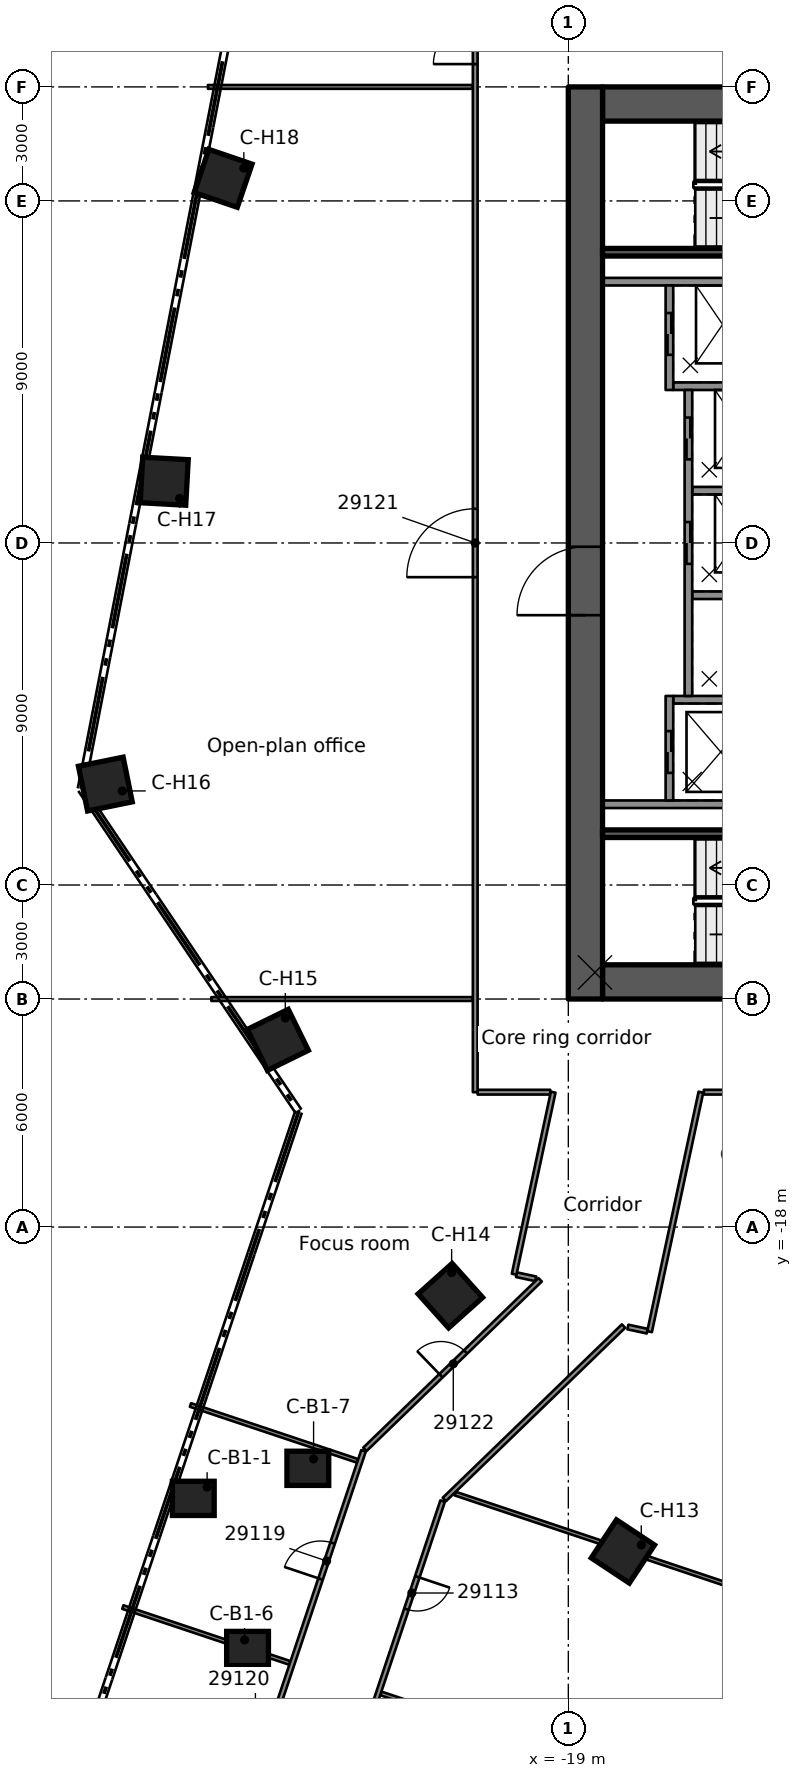
"""IFC4 building model, lengths in metres.
Left out: names, types, materials, properties, quantities, classifications, styles, units other than length and angle.
Written with IfcOpenShell. Run it as: python <this file> out.ifc"""

import sys

from ifc_helpers import new_model, si_unit, direction, frame, frame_2d, origin, origin_2d, place, context, subcontext, project, spatial, rectangle, extrude, element, fill, save


model = new_model("IFC4")
c1 = context("Model", 3, precision=1e-05, world=origin(), true_north=direction((0.0, 1.0)))
c2 = subcontext(c1, "Body", "Model", "MODEL_VIEW")
j1 = project(units=[si_unit("LENGTHUNIT", "METRE"), si_unit("PLANEANGLEUNIT", "RADIAN")], contexts=[c1])
p1 = place(None, origin())
s1 = spatial("IfcSite", under=j1, at=p1, CompositionType="ELEMENT")
p2 = place(p1, origin())
s2 = spatial("IfcBuilding", under=s1, at=p2, CompositionType="ELEMENT")
p3 = place(p2, frame((0.0, 0.0, 149.1)))
s3 = spatial("IfcBuildingStorey", under=s2, at=p3, CompositionType="ELEMENT", Elevation=149.1)
p4 = place(p3, frame((-18.1, 11.55, 0.0), z_axis=(0.0, 0.0, 1.0), x_axis=(1.0, 0.0, 0.0)))
e1 = element("IfcWall", 1, at=p4, inside=s3, PredefinedType="SHEAR", context=c2, shape_type="SweptSolid", body=[
    extrude(rectangle(XDim=9.2, YDim=0.9, at=frame_2d((4.6, 0.0))), origin(), (0.0, 0.0, 1.0), 3.5),
])
p5 = place(p4, frame((5.1, 0.0, 0.0)))
e2 = element("IfcOpeningElement", 2, at=p5, cuts=e1, PredefinedType="OPENING", context=c2, shape_type="SweptSolid", body=[
    extrude(rectangle(XDim=1.1, YDim=2.1, at=frame_2d((0.55, 1.05))), frame((0.0, 0.46, 0.0), z_axis=(0.0, -1.0, 0.0), x_axis=(1.0, 0.0, 0.0)), (0.0, 0.0, 1.0), 0.92),
])
p6 = place(p3, frame((-18.1, -11.55, 0.0), z_axis=(0.0, 0.0, 1.0), x_axis=(1.0, 0.0, 0.0)))
e3 = element("IfcWall", 3, at=p6, inside=s3, PredefinedType="SHEAR", context=c2, shape_type="SweptSolid", body=[
    extrude(rectangle(XDim=9.2, YDim=0.9, at=frame_2d((4.6, 0.0))), origin(), (0.0, 0.0, 1.0), 3.5),
])
p7 = place(p6, frame((5.1, 0.0, 0.0)))
e4 = element("IfcOpeningElement", 4, at=p7, cuts=e3, PredefinedType="OPENING", context=c2, shape_type="SweptSolid", body=[
    extrude(rectangle(XDim=1.1, YDim=2.1, at=frame_2d((0.55, 1.05))), frame((0.0, 0.46, 0.0), z_axis=(0.0, -1.0, 0.0), x_axis=(1.0, 0.0, 0.0)), (0.0, 0.0, 1.0), 0.92),
])
p8 = place(p6, frame((7.53, 0.0, 0.0)))
e5 = element("IfcOpeningElement", 5, at=p8, cuts=e3, PredefinedType="OPENING", context=c2, shape_type="SweptSolid", body=[
    extrude(rectangle(XDim=0.9, YDim=2.1, at=frame_2d((0.45, 1.05))), frame((0.0, 0.46, 0.0), z_axis=(0.0, -1.0, 0.0), x_axis=(1.0, 0.0, 0.0)), (0.0, 0.0, 1.0), 0.92),
])
p9 = place(p3, frame((-18.55, -12.0, 0.0), z_axis=(0.0, 0.0, 1.0), x_axis=(0.0, 1.0, 0.0)))
e6 = element("IfcWall", 6, at=p9, inside=s3, PredefinedType="SHEAR", context=c2, shape_type="SweptSolid", body=[
    extrude(rectangle(XDim=24.0, YDim=0.9, at=frame_2d((12.0, 0.0))), origin(), (0.0, 0.0, 1.0), 3.5),
])
p10 = place(p9, frame((10.1, 0.0, 0.0)))
e7 = element("IfcOpeningElement", 7, at=p10, cuts=e6, PredefinedType="OPENING", context=c2, shape_type="SweptSolid", body=[
    extrude(rectangle(XDim=1.8, YDim=2.1, at=frame_2d((0.9, 1.05))), frame((0.0, 0.46, 0.0), z_axis=(0.0, -1.0, 0.0), x_axis=(1.0, 0.0, 0.0)), (0.0, 0.0, 1.0), 0.92),
])
for number, where, z_axis, x_axis in (
    (8, (-28.869, -25.139, 0.0), (0.0, 0.0, 1.0), (1.0, 0.0, 0.0)),
    (9, (-27.441, -29.089, 0.0), (0.0, 0.0, 1.0), (1.0, 0.0, 0.0)),
    (10, (-25.855, -24.348, 0.0), (0.0, 0.0, 1.0), (1.0, 0.0, 0.0)),
):
    element("IfcColumn", number, at=place(p3, frame(where, z_axis=z_axis, x_axis=x_axis)), inside=s3, PredefinedType="COLUMN", context=c2, shape_type="SweptSolid", body=[
        extrude(rectangle(XDim=1.1, YDim=0.9, at=origin_2d()), origin(), (0.0, 0.0, 1.0), 3.5),
    ])
for number, where, z_axis, x_axis in (
    (11, (-17.564, -26.536, 0.0), (0.0, 0.0, 1.0), (-0.552, -0.834, 0.0)),
    (12, (-22.104, -19.806, 0.0), (0.0, 0.0, 1.0), (-0.745, -0.667, 0.0)),
    (13, (-26.644, -13.075, 0.0), (0.0, 0.0, 1.0), (-0.898, -0.441, 0.0)),
    (14, (-31.183, -6.344, 0.0), (0.0, 0.0, 1.0), (-0.98, -0.199, 0.0)),
    (15, (-29.634, 1.625, 0.0), (0.0, 0.0, 1.0), (-0.998, 0.055, 0.0)),
    (16, (-28.085, 9.594, 0.0), (0.0, 0.0, 1.0), (-0.946, 0.323, 0.0)),
):
    element("IfcColumn", number, at=place(p3, frame(where, z_axis=z_axis, x_axis=x_axis)), inside=s3, PredefinedType="COLUMN", context=c2, shape_type="SweptSolid", body=[
        extrude(rectangle(XDim=1.2, YDim=1.2, at=origin_2d()), origin(), (0.0, 0.0, 1.0), 3.5),
    ])
for number, where, z_axis, x_axis in (
    (17, (-11.54, 6.875, 0.0), (0.0, 0.0, 1.0), (-1.0, 0.0, 0.0)),
    (18, (-11.54, -6.875, 0.0), (0.0, 0.0, 1.0), (-1.0, 0.0, 0.0)),
):
    element("IfcWall", number, at=place(p3, frame(where, z_axis=z_axis, x_axis=x_axis)), inside=s3, PredefinedType="SOLIDWALL", context=c2, shape_type="SweptSolid", body=[
        extrude(rectangle(XDim=6.56, YDim=0.2, at=frame_2d((3.28, 0.0))), origin(), (0.0, 0.0, 1.0), 3.09),
    ])
p11 = place(p3, frame((-11.54, -4.125, 0.0), z_axis=(0.0, 0.0, 1.0), x_axis=(-1.0, 0.0, 0.0)))
e19 = element("IfcWall", 19, at=p11, inside=s3, PredefinedType="SOLIDWALL", context=c2, shape_type="SweptSolid", body=[
    extrude(rectangle(XDim=4.7, YDim=0.2, at=frame_2d((2.35, 0.0))), origin(), (0.0, 0.0, 1.0), 3.09),
])
p12 = place(p3, frame((-13.74, -1.375, 0.0), z_axis=(0.0, 0.0, 1.0), x_axis=(-1.0, 0.0, 0.0)))
e20 = element("IfcWall", 20, at=p12, inside=s3, PredefinedType="SOLIDWALL", context=c2, shape_type="SweptSolid", body=[
    extrude(rectangle(XDim=2.0, YDim=0.2, at=frame_2d((1.0, 0.0))), origin(), (0.0, 0.0, 1.0), 3.09),
])
p13 = place(p3, frame((-11.54, 1.375, 0.0), z_axis=(0.0, 0.0, 1.0), x_axis=(-1.0, 0.0, 0.0)))
e21 = element("IfcWall", 21, at=p13, inside=s3, PredefinedType="SOLIDWALL", context=c2, shape_type="SweptSolid", body=[
    extrude(rectangle(XDim=4.2, YDim=0.2, at=frame_2d((2.1, 0.0))), origin(), (0.0, 0.0, 1.0), 3.09),
])
p14 = place(p3, frame((-11.54, 4.125, 0.0), z_axis=(0.0, 0.0, 1.0), x_axis=(-1.0, 0.0, 0.0)))
e22 = element("IfcWall", 22, at=p14, inside=s3, PredefinedType="SOLIDWALL", context=c2, shape_type="SweptSolid", body=[
    extrude(rectangle(XDim=4.7, YDim=0.2, at=frame_2d((2.35, 0.0))), origin(), (0.0, 0.0, 1.0), 3.09),
])
p15 = place(p3, frame((-16.34, -6.775, 0.0), z_axis=(0.0, 0.0, 1.0), x_axis=(0.0, 1.0, 0.0)))
e23 = element("IfcWall", 23, at=p15, inside=s3, PredefinedType="SOLIDWALL", context=c2, shape_type="SweptSolid", body=[
    extrude(rectangle(XDim=2.75, YDim=0.2, at=frame_2d((1.375, 0.0))), origin(), (0.0, 0.0, 1.0), 3.09),
])
p16 = place(p15, frame((0.725, 0.0, 0.0)))
e24 = element("IfcOpeningElement", 24, at=p16, cuts=e23, PredefinedType="OPENING", context=c2, shape_type="SweptSolid", body=[
    extrude(rectangle(XDim=1.1, YDim=2.1, at=frame_2d((0.55, 1.05))), frame((0.0, 0.11, 0.0), z_axis=(0.0, -1.0, 0.0), x_axis=(1.0, 0.0, 0.0)), (0.0, 0.0, 1.0), 0.22),
])
p17 = place(p3, frame((-15.84, -4.025, 0.0), z_axis=(0.0, 0.0, 1.0), x_axis=(0.0, 1.0, 0.0)))
e25 = element("IfcWall", 25, at=p17, inside=s3, PredefinedType="SOLIDWALL", context=c2, shape_type="SweptSolid", body=[
    extrude(rectangle(XDim=8.05, YDim=0.2, at=frame_2d((4.025, 0.0))), origin(), (0.0, 0.0, 1.0), 3.09),
])
p18 = place(p17, frame((3.475, 0.0, 0.0)))
e26 = element("IfcOpeningElement", 26, at=p18, cuts=e25, PredefinedType="OPENING", context=c2, shape_type="SweptSolid", body=[
    extrude(rectangle(XDim=1.1, YDim=2.1, at=frame_2d((0.55, 1.05))), frame((0.0, 0.11, 0.0), z_axis=(0.0, -1.0, 0.0), x_axis=(1.0, 0.0, 0.0)), (0.0, 0.0, 1.0), 0.22),
])
p19 = place(p17, frame((6.225, 0.0, 0.0)))
e27 = element("IfcOpeningElement", 27, at=p19, cuts=e25, PredefinedType="OPENING", context=c2, shape_type="SweptSolid", body=[
    extrude(rectangle(XDim=1.1, YDim=2.1, at=frame_2d((0.55, 1.05))), frame((0.0, 0.11, 0.0), z_axis=(0.0, -1.0, 0.0), x_axis=(1.0, 0.0, 0.0)), (0.0, 0.0, 1.0), 0.22),
])
p20 = place(p3, frame((-16.34, 4.025, 0.0), z_axis=(0.0, 0.0, 1.0), x_axis=(0.0, 1.0, 0.0)))
e28 = element("IfcWall", 28, at=p20, inside=s3, PredefinedType="SOLIDWALL", context=c2, shape_type="SweptSolid", body=[
    extrude(rectangle(XDim=2.75, YDim=0.2, at=frame_2d((1.375, 0.0))), origin(), (0.0, 0.0, 1.0), 3.09),
])
p21 = place(p20, frame((0.925, 0.0, 0.0)))
e29 = element("IfcOpeningElement", 29, at=p21, cuts=e28, PredefinedType="OPENING", context=c2, shape_type="SweptSolid", body=[
    extrude(rectangle(XDim=1.1, YDim=2.1, at=frame_2d((0.55, 1.05))), frame((0.0, 0.11, 0.0), z_axis=(0.0, -1.0, 0.0), x_axis=(1.0, 0.0, 0.0)), (0.0, 0.0, 1.0), 0.22),
])
for number, where, z_axis, x_axis in (
    (30, (-11.54, 7.65, 0.0), (0.0, 0.0, 1.0), (-1.0, 0.0, 0.0)),
    (31, (-11.54, -7.65, 0.0), (0.0, 0.0, 1.0), (-1.0, 0.0, 0.0)),
):
    element("IfcWall", number, at=place(p3, frame(where, z_axis=z_axis, x_axis=x_axis)), inside=s3, PredefinedType="SOLIDWALL", context=c2, shape_type="SweptSolid", body=[
        extrude(rectangle(XDim=6.56, YDim=0.2, at=frame_2d((3.28, 0.0))), origin(), (0.0, 0.0, 1.0), 3.09),
    ])
p22 = place(p3, frame((-30.722, -27.999, 0.0), z_axis=(0.0, 0.0, 1.0), x_axis=(0.948355935611, -0.317208164132, 0.0)))
e32 = element("IfcWall", 32, at=p22, inside=s3, PredefinedType="PARTITIONING", context=c2, shape_type="SweptSolid", body=[
    extrude(rectangle(XDim=4.631, YDim=0.1, at=frame_2d((2.315, 0.0))), origin(), (0.0, 0.0, 1.0), 3.08),
])
p23 = place(p3, frame((-23.935, -30.27, 0.0), z_axis=(0.0, 0.0, 1.0), x_axis=(0.948326561211, -0.317295971139, 0.0)))
e33 = element("IfcWall", 33, at=p23, inside=s3, PredefinedType="PARTITIONING", context=c2, shape_type="SweptSolid", body=[
    extrude(rectangle(XDim=26.187, YDim=0.1, at=frame_2d((13.094, 0.0))), origin(), (0.0, 0.0, 1.0), 3.08),
])
p24 = place(p3, frame((-28.943, -22.682, 0.0), z_axis=(0.0, 0.0, 1.0), x_axis=(0.948361239818, -0.317192305725, 0.0)))
e34 = element("IfcWall", 34, at=p24, inside=s3, PredefinedType="PARTITIONING", context=c2, shape_type="SweptSolid", body=[
    extrude(rectangle(XDim=4.631, YDim=0.1, at=frame_2d((2.316, 0.0))), origin(), (0.0, 0.0, 1.0), 3.08),
])
p25 = place(p3, frame((-21.98, -25.012, 0.0), z_axis=(0.0, 0.0, 1.0), x_axis=(0.948312916699, -0.317336748614, 0.0)))
e35 = element("IfcWall", 35, at=p25, inside=s3, PredefinedType="PARTITIONING", context=c2, shape_type="SweptSolid", body=[
    extrude(rectangle(XDim=25.818, YDim=0.1, at=frame_2d((12.909, 0.0))), origin(), (0.0, 0.0, 1.0), 3.08),
])
p26 = place(p3, frame((-17.433, -20.63, 0.0), z_axis=(0.0, 0.0, 1.0), x_axis=(0.977781820865, -0.209625167351, 0.0)))
e36 = element("IfcWall", 36, at=p26, inside=s3, PredefinedType="PARTITIONING", context=c2, shape_type="SweptSolid", body=[
    extrude(rectangle(XDim=0.521, YDim=0.125, at=frame_2d((0.26, 0.0))), origin(), (0.0, 0.0, 1.0), 3.08),
])
p27 = place(p3, frame((-20.364, -19.254, 0.0), z_axis=(0.0, 0.0, 1.0), x_axis=(0.977699164018, -0.210010344217, 0.0)))
e37 = element("IfcWall", 37, at=p27, inside=s3, PredefinedType="PARTITIONING", context=c2, shape_type="SweptSolid", body=[
    extrude(rectangle(XDim=0.52, YDim=0.125, at=frame_2d((0.26, 0.0))), origin(), (0.0, 0.0, 1.0), 3.08),
])
p28 = place(p3, frame((-21.387, -14.451, 0.0), z_axis=(0.0, 0.0, 1.0), x_axis=(1.0, 0.0, 0.0)))
e38 = element("IfcWall", 38, at=p28, inside=s3, PredefinedType="PARTITIONING", context=c2, shape_type="SweptSolid", body=[
    extrude(rectangle(XDim=1.912, YDim=0.125, at=frame_2d((0.956, 0.0))), origin(), (0.0, 0.0, 1.0), 3.08),
])
p29 = place(p3, frame((-10.391, -14.451, 0.0), z_axis=(0.0, 0.0, 1.0), x_axis=(-1.0, 0.0, 0.0)))
e39 = element("IfcWall", 39, at=p29, inside=s3, PredefinedType="PARTITIONING", context=c2, shape_type="SweptSolid", body=[
    extrude(rectangle(XDim=5.043, YDim=0.125, at=frame_2d((2.521, 0.0))), origin(), (0.0, 0.0, 1.0), 3.08),
])
p30 = place(p29, frame((2.1, 0.0, 0.0)))
e40 = element("IfcOpeningElement", 40, at=p30, cuts=e39, PredefinedType="OPENING", context=c2, shape_type="SweptSolid", body=[
    extrude(rectangle(XDim=0.9, YDim=2.1, at=frame_2d((0.45, 1.05))), frame((0.0, 0.073, 0.0), z_axis=(0.0, -1.0, 0.0), x_axis=(1.0, 0.0, 0.0)), (0.0, 0.0, 1.0), 0.145),
])
p31 = place(p3, frame((-28.394, -12.0, 0.0), z_axis=(0.0, 0.0, 1.0), x_axis=(1.0, 0.0, 0.0)))
e41 = element("IfcWall", 41, at=p31, inside=s3, PredefinedType="PARTITIONING", context=c2, shape_type="SweptSolid", body=[
    extrude(rectangle(XDim=6.882, YDim=0.1, at=frame_2d((3.441, 0.0))), origin(), (0.0, 0.0, 1.0), 3.08),
])
p32 = place(p3, frame((-28.484, 12.0, 0.0), z_axis=(0.0, 0.0, 1.0), x_axis=(1.0, 0.0, 0.0)))
e42 = element("IfcWall", 42, at=p32, inside=s3, PredefinedType="PARTITIONING", context=c2, shape_type="SweptSolid", body=[
    extrude(rectangle(XDim=6.972, YDim=0.1, at=frame_2d((3.486, 0.0))), origin(), (0.0, 0.0, 1.0), 3.08),
])
p33 = place(p3, frame((-17.547, -20.605, 0.0), z_axis=(0.0, 0.0, 1.0), x_axis=(-0.718656118165, -0.695365647572, 0.0)))
e43 = element("IfcWall", 43, at=p33, inside=s3, PredefinedType="PARTITIONING", context=c2, shape_type="SweptSolid", body=[
    extrude(rectangle(XDim=6.562, YDim=0.125, at=frame_2d((3.281, 0.0))), origin(), (0.0, 0.0, 1.0), 3.08),
])
p34 = place(p3, frame((-24.354, -23.85, 0.0), z_axis=(0.0, 0.0, 1.0), x_axis=(0.718689835624, 0.695330799095, 0.0)))
e44 = element("IfcWall", 44, at=p34, inside=s3, PredefinedType="PARTITIONING", context=c2, shape_type="SweptSolid", body=[
    extrude(rectangle(XDim=6.417, YDim=0.125, at=frame_2d((3.208, 0.0))), origin(), (0.0, 0.0, 1.0), 3.08),
])
p35 = place(p34, frame((2.788, 0.0, 0.0)))
e45 = element("IfcOpeningElement", 45, at=p35, cuts=e44, PredefinedType="OPENING", context=c2, shape_type="SweptSolid", body=[
    extrude(rectangle(XDim=0.9, YDim=2.1, at=frame_2d((0.45, 1.05))), frame((0.0, 0.073, 0.0), z_axis=(0.0, -1.0, 0.0), x_axis=(1.0, 0.0, 0.0)), (0.0, 0.0, 1.0), 0.145),
])
p36 = place(p3, frame((-22.308, -25.211, 0.0), z_axis=(0.0, 0.0, 1.0), x_axis=(-0.317283910316, -0.948330596498, 0.0)))
e46 = element("IfcWall", 46, at=p36, inside=s3, PredefinedType="PARTITIONING", context=c2, shape_type="SweptSolid", body=[
    extrude(rectangle(XDim=11.51, YDim=0.125, at=frame_2d((5.755, 0.0))), origin(), (0.0, 0.0, 1.0), 3.08),
])
p37 = place(p36, frame((2.1, 0.0, 0.0)))
e47 = element("IfcOpeningElement", 47, at=p37, cuts=e46, PredefinedType="OPENING", context=c2, shape_type="SweptSolid", body=[
    extrude(rectangle(XDim=0.9, YDim=2.1, at=frame_2d((0.45, 1.05))), frame((0.0, 0.073, 0.0), z_axis=(0.0, -1.0, 0.0), x_axis=(1.0, 0.0, 0.0)), (0.0, 0.0, 1.0), 0.145),
])
p38 = place(p36, frame((7.914, 0.0, 0.0)))
e48 = element("IfcOpeningElement", 48, at=p38, cuts=e46, PredefinedType="OPENING", context=c2, shape_type="SweptSolid", body=[
    extrude(rectangle(XDim=0.9, YDim=2.1, at=frame_2d((0.45, 1.05))), frame((0.0, 0.073, 0.0), z_axis=(0.0, -1.0, 0.0), x_axis=(1.0, 0.0, 0.0)), (0.0, 0.0, 1.0), 0.145),
])
p39 = place(p3, frame((-30.714, -42.764, 0.0), z_axis=(0.0, 0.0, 1.0), x_axis=(0.317699123241, 0.94819157721, 0.0)))
e49 = element("IfcWall", 49, at=p39, inside=s3, PredefinedType="PARTITIONING", context=c2, shape_type="SweptSolid", body=[
    extrude(rectangle(XDim=19.906, YDim=0.125, at=frame_2d((9.953, 0.0))), origin(), (0.0, 0.0, 1.0), 3.08),
])
p40 = place(p39, frame((16.35, 0.0, 0.0)))
e50 = element("IfcOpeningElement", 50, at=p40, cuts=e49, PredefinedType="OPENING", context=c2, shape_type="SweptSolid", body=[
    extrude(rectangle(XDim=1.0, YDim=2.1, at=frame_2d((0.5, 1.05))), frame((0.0, 0.073, 0.0), z_axis=(0.0, -1.0, 0.0), x_axis=(1.0, 0.0, 0.0)), (0.0, 0.0, 1.0), 0.145),
])
p41 = place(p39, frame((10.403, 0.0, 0.0)))
e51 = element("IfcOpeningElement", 51, at=p41, cuts=e49, PredefinedType="OPENING", context=c2, shape_type="SweptSolid", body=[
    extrude(rectangle(XDim=1.1, YDim=2.1, at=frame_2d((0.55, 1.05))), frame((0.0, 0.073, 0.0), z_axis=(0.0, -1.0, 0.0), x_axis=(1.0, 0.0, 0.0)), (0.0, 0.0, 1.0), 0.145),
])
p42 = place(p3, frame((-16.862, -20.752, 0.0), z_axis=(0.0, 0.0, 1.0), x_axis=(0.209655863281, 0.977775239506, 0.0)))
e52 = element("IfcWall", 52, at=p42, inside=s3, PredefinedType="PARTITIONING", context=c2, shape_type="SweptSolid", body=[
    extrude(rectangle(XDim=6.444, YDim=0.125, at=frame_2d((3.222, 0.0))), origin(), (0.0, 0.0, 1.0), 3.08),
])
p43 = place(p3, frame((-19.398, -14.451, 0.0), z_axis=(0.0, 0.0, 1.0), x_axis=(-0.209848984455, -0.977733810259, 0.0)))
e53 = element("IfcWall", 53, at=p43, inside=s3, PredefinedType="PARTITIONING", context=c2, shape_type="SweptSolid", body=[
    extrude(rectangle(XDim=4.899, YDim=0.125, at=frame_2d((2.45, 0.0))), origin(), (0.0, 0.0, 1.0), 3.08),
])
p44 = place(p3, frame((-21.45, -14.451, 0.0), z_axis=(0.0, 0.0, 1.0), x_axis=(0.0, 1.0, 0.0)))
e54 = element("IfcWall", 54, at=p44, inside=s3, PredefinedType="PARTITIONING", context=c2, shape_type="SweptSolid", body=[
    extrude(rectangle(XDim=28.902, YDim=0.125, at=frame_2d((14.451, 0.0))), origin(), (0.0, 0.0, 1.0), 3.08),
])
p45 = place(p44, frame((13.551, 0.0, 0.0)))
e55 = element("IfcOpeningElement", 55, at=p45, cuts=e54, PredefinedType="OPENING", context=c2, shape_type="SweptSolid", body=[
    extrude(rectangle(XDim=1.8, YDim=2.1, at=frame_2d((0.9, 1.05))), frame((0.0, 0.073, 0.0), z_axis=(0.0, -1.0, 0.0), x_axis=(1.0, 0.0, 0.0)), (0.0, 0.0, 1.0), 0.145),
])
p46 = place(p44, frame((27.051, 0.0, 0.0)))
e56 = element("IfcOpeningElement", 56, at=p46, cuts=e54, PredefinedType="OPENING", context=c2, shape_type="SweptSolid", body=[
    extrude(rectangle(XDim=1.1, YDim=2.1, at=frame_2d((0.55, 1.05))), frame((0.0, 0.073, 0.0), z_axis=(0.0, -1.0, 0.0), x_axis=(1.0, 0.0, 0.0)), (0.0, 0.0, 1.0), 0.145),
])
p47 = place(p16, origin())
e57 = element("IfcDoor", 57, at=p47, inside=s3, OperationType="DOUBLE_DOOR_SLIDING", PredefinedType="DOOR", context=c2, shape_type="SweptSolid", body=[
    extrude(rectangle(XDim=1.1, YDim=2.1, at=frame_2d((0.55, 1.05))), frame((0.0, 0.025, 0.0), z_axis=(0.0, -1.0, 0.0), x_axis=(1.0, 0.0, 0.0)), (0.0, 0.0, 1.0), 0.05),
])
fill(e24, e57)
p48 = place(p18, origin())
e58 = element("IfcDoor", 58, at=p48, inside=s3, OperationType="DOUBLE_DOOR_SLIDING", PredefinedType="DOOR", context=c2, shape_type="SweptSolid", body=[
    extrude(rectangle(XDim=1.1, YDim=2.1, at=frame_2d((0.55, 1.05))), frame((0.0, 0.025, 0.0), z_axis=(0.0, -1.0, 0.0), x_axis=(1.0, 0.0, 0.0)), (0.0, 0.0, 1.0), 0.05),
])
fill(e26, e58)
p49 = place(p19, origin())
e59 = element("IfcDoor", 59, at=p49, inside=s3, OperationType="DOUBLE_DOOR_SLIDING", PredefinedType="DOOR", context=c2, shape_type="SweptSolid", body=[
    extrude(rectangle(XDim=1.1, YDim=2.1, at=frame_2d((0.55, 1.05))), frame((0.0, 0.025, 0.0), z_axis=(0.0, -1.0, 0.0), x_axis=(1.0, 0.0, 0.0)), (0.0, 0.0, 1.0), 0.05),
])
fill(e27, e59)
p50 = place(p21, origin())
e60 = element("IfcDoor", 60, at=p50, inside=s3, OperationType="DOUBLE_DOOR_SLIDING", PredefinedType="DOOR", context=c2, shape_type="SweptSolid", body=[
    extrude(rectangle(XDim=1.1, YDim=2.1, at=frame_2d((0.55, 1.05))), frame((0.0, 0.025, 0.0), z_axis=(0.0, -1.0, 0.0), x_axis=(1.0, 0.0, 0.0)), (0.0, 0.0, 1.0), 0.05),
])
fill(e29, e60)
p51 = place(p10, origin())
e61 = element("IfcDoor", 61, at=p51, inside=s3, OperationType="SINGLE_SWING_LEFT", PredefinedType="DOOR", context=c2, shape_type="SweptSolid", body=[
    extrude(rectangle(XDim=1.8, YDim=2.1, at=frame_2d((0.9, 1.05))), frame((0.0, 0.025, 0.0), z_axis=(0.0, -1.0, 0.0), x_axis=(1.0, 0.0, 0.0)), (0.0, 0.0, 1.0), 0.05),
])
fill(e7, e61)
p52 = place(p37, origin())
e62 = element("IfcDoor", 62, at=p52, inside=s3, OperationType="SINGLE_SWING_LEFT", PredefinedType="DOOR", context=c2, shape_type="SweptSolid", body=[
    extrude(rectangle(XDim=0.9, YDim=2.1, at=frame_2d((0.45, 1.05))), frame((0.0, 0.025, 0.0), z_axis=(0.0, -1.0, 0.0), x_axis=(1.0, 0.0, 0.0)), (0.0, 0.0, 1.0), 0.05),
])
fill(e47, e62)
p53 = place(p40, origin())
e63 = element("IfcDoor", 63, at=p53, inside=s3, OperationType="SINGLE_SWING_RIGHT", PredefinedType="DOOR", context=c2, shape_type="SweptSolid", body=[
    extrude(rectangle(XDim=1.0, YDim=2.1, at=frame_2d((0.5, 1.05))), frame((0.0, 0.025, 0.0), z_axis=(0.0, -1.0, 0.0), x_axis=(1.0, 0.0, 0.0)), (0.0, 0.0, 1.0), 0.05),
])
fill(e50, e63)
p54 = place(p45, origin())
e64 = element("IfcDoor", 64, at=p54, inside=s3, OperationType="DOUBLE_DOOR_SINGLE_SWING", PredefinedType="DOOR", context=c2, shape_type="SweptSolid", body=[
    extrude(rectangle(XDim=1.8, YDim=2.1, at=frame_2d((0.9, 1.05))), frame((0.0, 0.025, 0.0), z_axis=(0.0, -1.0, 0.0), x_axis=(1.0, 0.0, 0.0)), (0.0, 0.0, 1.0), 0.05),
])
fill(e55, e64)
p55 = place(p35, origin())
e65 = element("IfcDoor", 65, at=p55, inside=s3, OperationType="SINGLE_SWING_RIGHT", PredefinedType="DOOR", context=c2, shape_type="SweptSolid", body=[
    extrude(rectangle(XDim=0.9, YDim=2.1, at=frame_2d((0.45, 1.05))), frame((0.0, 0.025, 0.0), z_axis=(0.0, -1.0, 0.0), x_axis=(1.0, 0.0, 0.0)), (0.0, 0.0, 1.0), 0.05),
])
fill(e45, e65)
p56 = place(p46, origin())
e66 = element("IfcDoor", 66, at=p56, inside=s3, OperationType="SINGLE_SWING_RIGHT", PredefinedType="DOOR", context=c2, shape_type="SweptSolid", body=[
    extrude(rectangle(XDim=1.1, YDim=2.1, at=frame_2d((0.55, 1.05))), frame((0.0, 0.025, 0.0), z_axis=(0.0, -1.0, 0.0), x_axis=(1.0, 0.0, 0.0)), (0.0, 0.0, 1.0), 0.05),
])
fill(e56, e66)
save(model, sys.argv[1])
